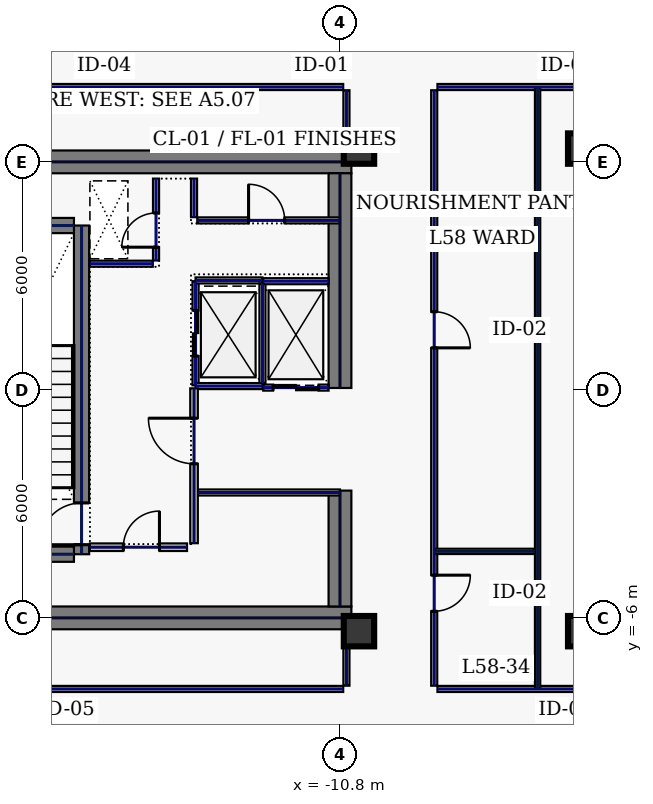
"""IFC4 building model, lengths in metres.
Left out: names, types, materials, properties, quantities, classifications, styles, units other than length and angle.
Written with IfcOpenShell. Run it as: python <this file> out.ifc"""

import sys

from ifc_helpers import new_model, si_unit, direction, frame, frame_2d, origin, origin_2d, place, context, subcontext, project, spatial, rectangle, hollow_rectangle, extrude, element, fill, save


model = new_model("IFC4")
c1 = context("Model", 3, precision=1e-05, world=origin(), true_north=direction((0.0, 1.0)))
c2 = subcontext(c1, "Body", "Model", "MODEL_VIEW")
j1 = project(units=[si_unit("LENGTHUNIT", "METRE"), si_unit("PLANEANGLEUNIT", "RADIAN")], contexts=[c1])
p1 = place(None, origin())
s1 = spatial("IfcSite", under=j1, at=p1, CompositionType="ELEMENT")
p2 = place(p1, origin())
s2 = spatial("IfcBuilding", under=s1, at=p2, CompositionType="ELEMENT")
p3 = place(p2, frame((0.0, 0.0, 251.0)))
s3 = spatial("IfcBuildingStorey", under=s2, at=p3, CompositionType="ELEMENT", Elevation=251.0)
for number, where, z_axis, x_axis in (
    (1, (-22.0, 6.0, 0.0), (0.0, 0.0, 1.0), (1.0, 0.0, 0.0)),
    (2, (-22.0, -6.0, 0.0), (0.0, 0.0, 1.0), (1.0, 0.0, 0.0)),
):
    element("IfcWall", number, at=place(p3, frame(where, z_axis=z_axis, x_axis=x_axis)), inside=s3, PredefinedType="SHEAR", context=c2, shape_type="SweptSolid", body=[
        extrude(rectangle(XDim=11.5, YDim=0.6, at=frame_2d((5.75, 0.0))), origin(), (0.0, 0.0, 1.0), 3.74),
    ])
p4 = place(p3, frame((-10.8, -5.7, 0.0), z_axis=(0.0, 0.0, 1.0), x_axis=(0.0, 1.0, 0.0)))
e3 = element("IfcWall", 3, at=p4, inside=s3, PredefinedType="SHEAR", context=c2, shape_type="SweptSolid", body=[
    extrude(rectangle(XDim=3.05, YDim=0.6, at=frame_2d((1.525, 0.0))), origin(), (0.0, 0.0, 1.0), 3.74),
])
p5 = place(p3, frame((-10.8, 0.05, 0.0), z_axis=(0.0, 0.0, 1.0), x_axis=(0.0, 1.0, 0.0)))
e4 = element("IfcWall", 4, at=p5, inside=s3, PredefinedType="SHEAR", context=c2, shape_type="SweptSolid", body=[
    extrude(rectangle(XDim=5.65, YDim=0.6, at=frame_2d((2.825, 0.0))), origin(), (0.0, 0.0, 1.0), 3.74),
])
p6 = place(p3, frame((-17.6, -4.325, 0.0), z_axis=(0.0, 0.0, 1.0), x_axis=(0.0, 1.0, 0.0)))
e5 = element("IfcWall", 5, at=p6, inside=s3, PredefinedType="SHEAR", context=c2, shape_type="SweptSolid", body=[
    extrude(rectangle(XDim=8.65, YDim=0.4, at=frame_2d((4.325, 0.0))), origin(), (0.0, 0.0, 1.0), 3.74),
])
p7 = place(p6, frame((0.25, 0.0, 0.0)))
e6 = element("IfcOpeningElement", 6, at=p7, cuts=e5, PredefinedType="OPENING", context=c2, shape_type="SweptSolid", body=[
    extrude(rectangle(XDim=1.1, YDim=2.2, at=frame_2d((0.55, 1.1))), frame((0.0, 0.21, 0.0), z_axis=(0.0, -1.0, 0.0), x_axis=(1.0, 0.0, 0.0)), (0.0, 0.0, 1.0), 0.42),
])
for number, where, z_axis, x_axis in (
    (7, (-21.2, -4.325, 0.0), (0.0, 0.0, 1.0), (1.0, 0.0, 0.0)),
    (8, (-21.2, 4.325, 0.0), (0.0, 0.0, 1.0), (1.0, 0.0, 0.0)),
):
    element("IfcWall", number, at=place(p3, frame(where, z_axis=z_axis, x_axis=x_axis)), inside=s3, PredefinedType="SHEAR", context=c2, shape_type="SweptSolid", body=[
        extrude(rectangle(XDim=3.4, YDim=0.4, at=frame_2d((1.7, 0.0))), origin(), (0.0, 0.0, 1.0), 3.74),
    ])
for number, where, z_axis, x_axis in (
    (9, (-10.3, -6.35, 0.0), (0.0, 0.0, 1.0), (1.0, 0.0, 0.0)),
    (10, (-10.3, 6.35, 0.0), (0.0, 0.0, 1.0), (1.0, 0.0, 0.0)),
    (11, (-4.4, -6.35, 0.0), (0.0, 0.0, 1.0), (1.0, 0.0, 0.0)),
    (12, (-4.4, 6.35, 0.0), (0.0, 0.0, 1.0), (1.0, 0.0, 0.0)),
):
    element("IfcColumn", number, at=place(p3, frame(where, z_axis=z_axis, x_axis=x_axis)), inside=s3, PredefinedType="COLUMN", context=c2, shape_type="SweptSolid", body=[
        extrude(hollow_rectangle(XDim=0.8, YDim=0.8, WallThickness=0.036, at=origin_2d()), origin(), (0.0, 0.0, 1.0), 3.74),
    ])
p8 = place(p3, frame((-14.6, 0.12, 0.0), z_axis=(0.0, 0.0, 1.0), x_axis=(0.0, 1.0, 0.0)))
e13 = element("IfcWall", 13, at=p8, inside=s3, PredefinedType="PARTITIONING", context=c2, shape_type="SweptSolid", body=[
    extrude(rectangle(XDim=2.74, YDim=0.16, at=frame_2d((1.37, 0.0))), origin(), (0.0, 0.0, 1.0), 3.74),
])
p9 = place(p8, frame((0.77, 0.0, 0.0)))
e14 = element("IfcOpeningElement", 14, at=p9, cuts=e13, PredefinedType="OPENING", context=c2, shape_type="SweptSolid", body=[
    extrude(rectangle(XDim=1.2, YDim=2.2, at=frame_2d((0.6, 1.1))), frame((0.0, 0.09, 0.0), z_axis=(0.0, -1.0, 0.0), x_axis=(1.0, 0.0, 0.0)), (0.0, 0.0, 1.0), 0.18),
])
for number, where, z_axis, x_axis in (
    (15, (-14.6, 0.1, 0.0), (0.0, 0.0, 1.0), (1.0, 0.0, 0.0)),
    (16, (-14.6, 2.88, 0.0), (0.0, 0.0, 1.0), (1.0, 0.0, 0.0)),
):
    element("IfcWall", number, at=place(p3, frame(where, z_axis=z_axis, x_axis=x_axis)), inside=s3, PredefinedType="PARTITIONING", context=c2, shape_type="SweptSolid", body=[
        extrude(rectangle(XDim=1.76, YDim=0.16, at=frame_2d((0.88, 0.0))), origin(), (0.0, 0.0, 1.0), 3.74),
    ])
p10 = place(p3, frame((-12.84, 0.18, 0.0), z_axis=(0.0, 0.0, 1.0), x_axis=(0.0, 1.0, 0.0)))
e17 = element("IfcWall", 17, at=p10, inside=s3, PredefinedType="PARTITIONING", context=c2, shape_type="SweptSolid", body=[
    extrude(rectangle(XDim=2.62, YDim=0.16, at=frame_2d((1.31, 0.0))), origin(), (0.0, 0.0, 1.0), 3.74),
])
p11 = place(p3, frame((-12.82, 0.06, 0.0), z_axis=(0.0, 0.0, 1.0), x_axis=(1.0, 0.0, 0.0)))
e18 = element("IfcWall", 18, at=p11, inside=s3, PredefinedType="PARTITIONING", context=c2, shape_type="SweptSolid", body=[
    extrude(rectangle(XDim=1.72, YDim=0.16, at=frame_2d((0.86, 0.0))), origin(), (0.0, 0.0, 1.0), 3.74),
])
p12 = place(p11, frame((0.26, 0.0, 0.0)))
e19 = element("IfcOpeningElement", 19, at=p12, cuts=e18, PredefinedType="OPENING", context=c2, shape_type="SweptSolid", body=[
    extrude(rectangle(XDim=1.2, YDim=2.2, at=frame_2d((0.6, 1.1))), frame((0.0, 0.09, 0.0), z_axis=(0.0, -1.0, 0.0), x_axis=(1.0, 0.0, 0.0)), (0.0, 0.0, 1.0), 0.18),
])
p13 = place(p3, frame((-12.82, 2.86, 0.0), z_axis=(0.0, 0.0, 1.0), x_axis=(1.0, 0.0, 0.0)))
e20 = element("IfcWall", 20, at=p13, inside=s3, PredefinedType="PARTITIONING", context=c2, shape_type="SweptSolid", body=[
    extrude(rectangle(XDim=1.72, YDim=0.16, at=frame_2d((0.86, 0.0))), origin(), (0.0, 0.0, 1.0), 3.74),
])
p14 = place(p3, frame((-15.64, 3.405, 0.0), z_axis=(0.0, 0.0, 1.0), x_axis=(0.0, 1.0, 0.0)))
e21 = element("IfcWall", 21, at=p14, inside=s3, PredefinedType="PARTITIONING", context=c2, shape_type="SweptSolid", body=[
    extrude(rectangle(XDim=2.155, YDim=0.16, at=frame_2d((1.078, 0.0))), origin(), (0.0, 0.0, 1.0), 3.74),
])
p15 = place(p14, frame((0.35, 0.0, 0.0)))
e22 = element("IfcOpeningElement", 22, at=p15, cuts=e21, PredefinedType="OPENING", context=c2, shape_type="SweptSolid", body=[
    extrude(rectangle(XDim=0.9, YDim=2.2, at=frame_2d((0.45, 1.1))), frame((0.0, 0.09, 0.0), z_axis=(0.0, -1.0, 0.0), x_axis=(1.0, 0.0, 0.0)), (0.0, 0.0, 1.0), 0.18),
])
p16 = place(p3, frame((-17.38, 3.32, 0.0), z_axis=(0.0, 0.0, 1.0), x_axis=(1.0, 0.0, 0.0)))
e23 = element("IfcWall", 23, at=p16, inside=s3, PredefinedType="PARTITIONING", context=c2, shape_type="SweptSolid", body=[
    extrude(rectangle(XDim=1.655, YDim=0.16, at=frame_2d((0.827, 0.0))), origin(), (0.0, 0.0, 1.0), 3.74),
])
p17 = place(p3, frame((-17.38, -4.14, 0.0), z_axis=(0.0, 0.0, 1.0), x_axis=(1.0, 0.0, 0.0)))
e24 = element("IfcWall", 24, at=p17, inside=s3, PredefinedType="SOLIDWALL", context=c2, shape_type="SweptSolid", body=[
    extrude(rectangle(XDim=2.555, YDim=0.2, at=frame_2d((1.277, 0.0))), origin(), (0.0, 0.0, 1.0), 3.74),
])
p18 = place(p17, frame((0.88, 0.0, 0.0)))
e25 = element("IfcOpeningElement", 25, at=p18, cuts=e24, PredefinedType="OPENING", context=c2, shape_type="SweptSolid", body=[
    extrude(rectangle(XDim=0.95, YDim=2.2, at=frame_2d((0.475, 1.1))), frame((0.0, 0.11, 0.0), z_axis=(0.0, -1.0, 0.0), x_axis=(1.0, 0.0, 0.0)), (0.0, 0.0, 1.0), 0.22),
])
p19 = place(p3, frame((-14.535, -2.7, 0.0), z_axis=(0.0, 0.0, 1.0), x_axis=(1.0, 0.0, 0.0)))
e26 = element("IfcWall", 26, at=p19, inside=s3, PredefinedType="PARTITIONING", context=c2, shape_type="SweptSolid", body=[
    extrude(rectangle(XDim=3.735, YDim=0.16, at=frame_2d((1.867, 0.0))), origin(), (0.0, 0.0, 1.0), 3.74),
])
p20 = place(p3, frame((-14.555, 4.46, 0.0), z_axis=(0.0, 0.0, 1.0), x_axis=(1.0, 0.0, 0.0)))
e27 = element("IfcWall", 27, at=p20, inside=s3, PredefinedType="PARTITIONING", context=c2, shape_type="SweptSolid", body=[
    extrude(rectangle(XDim=3.755, YDim=0.16, at=frame_2d((1.877, 0.0))), origin(), (0.0, 0.0, 1.0), 3.74),
])
p21 = place(p20, frame((1.35, 0.0, 0.0)))
e28 = element("IfcOpeningElement", 28, at=p21, cuts=e27, PredefinedType="OPENING", context=c2, shape_type="SweptSolid", body=[
    extrude(rectangle(XDim=0.95, YDim=2.2, at=frame_2d((0.475, 1.1))), frame((0.0, 0.09, 0.0), z_axis=(0.0, -1.0, 0.0), x_axis=(1.0, 0.0, 0.0)), (0.0, 0.0, 1.0), 0.18),
])
p22 = place(p3, frame((-14.64, 4.545, 0.0), z_axis=(0.0, 0.0, 1.0), x_axis=(0.0, 1.0, 0.0)))
e29 = element("IfcWall", 29, at=p22, inside=s3, PredefinedType="PARTITIONING", context=c2, shape_type="SweptSolid", body=[
    extrude(rectangle(XDim=1.015, YDim=0.16, at=frame_2d((0.508, 0.0))), origin(), (0.0, 0.0, 1.0), 3.74),
])
p23 = place(p3, frame((-14.64, -4.035, 0.0), z_axis=(0.0, 0.0, 1.0), x_axis=(0.0, 1.0, 0.0)))
e30 = element("IfcWall", 30, at=p23, inside=s3, PredefinedType="SOLIDWALL", context=c2, shape_type="SweptSolid", body=[
    extrude(rectangle(XDim=4.075, YDim=0.2, at=frame_2d((2.038, 0.0))), origin(), (0.0, 0.0, 1.0), 3.74),
])
p24 = place(p23, frame((2.09, 0.0, 0.0)))
e31 = element("IfcOpeningElement", 31, at=p24, cuts=e30, PredefinedType="OPENING", context=c2, shape_type="SweptSolid", body=[
    extrude(rectangle(XDim=1.2, YDim=2.2, at=frame_2d((0.6, 1.1))), frame((0.0, 0.11, 0.0), z_axis=(0.0, -1.0, 0.0), x_axis=(1.0, 0.0, 0.0)), (0.0, 0.0, 1.0), 0.22),
])
p25 = place(p3, frame((-3.965, 7.97, 0.0), z_axis=(0.0, 0.0, 1.0), x_axis=(-1.0, 0.0, 0.0)))
e32 = element("IfcWall", 32, at=p25, inside=s3, PredefinedType="PARTITIONING", context=c2, shape_type="SweptSolid", body=[
    extrude(rectangle(XDim=4.27, YDim=0.16, at=frame_2d((2.135, 0.0))), origin(), (0.0, 0.0, 1.0), 3.74),
])
p26 = place(p3, frame((-8.32, 7.885, 0.0), z_axis=(0.0, 0.0, 1.0), x_axis=(0.0, -1.0, 0.0)))
e33 = element("IfcWall", 33, at=p26, inside=s3, PredefinedType="PARTITIONING", context=c2, shape_type="SweptSolid", body=[
    extrude(rectangle(XDim=15.67, YDim=0.16, at=frame_2d((7.835, 0.0))), origin(), (0.0, 0.0, 1.0), 3.74),
])
p27 = place(p26, frame((12.761, 0.0, 0.0)))
e34 = element("IfcOpeningElement", 34, at=p27, cuts=e33, PredefinedType="OPENING", context=c2, shape_type="SweptSolid", body=[
    extrude(rectangle(XDim=0.95, YDim=2.2, at=frame_2d((0.475, 1.1))), frame((0.0, 0.09, 0.0), z_axis=(0.0, -1.0, 0.0), x_axis=(1.0, 0.0, 0.0)), (0.0, 0.0, 1.0), 0.18),
])
p28 = place(p26, frame((5.829, 0.0, 0.0)))
e35 = element("IfcOpeningElement", 35, at=p28, cuts=e33, PredefinedType="OPENING", context=c2, shape_type="SweptSolid", body=[
    extrude(rectangle(XDim=0.95, YDim=2.2, at=frame_2d((0.475, 1.1))), frame((0.0, 0.09, 0.0), z_axis=(0.0, -1.0, 0.0), x_axis=(1.0, 0.0, 0.0)), (0.0, 0.0, 1.0), 0.18),
])
p29 = place(p3, frame((-8.235, -7.87, 0.0), z_axis=(0.0, 0.0, 1.0), x_axis=(1.0, 0.0, 0.0)))
e36 = element("IfcWall", 36, at=p29, inside=s3, PredefinedType="PARTITIONING", context=c2, shape_type="SweptSolid", body=[
    extrude(rectangle(XDim=4.27, YDim=0.16, at=frame_2d((2.135, 0.0))), origin(), (0.0, 0.0, 1.0), 3.74),
])
p30 = place(p3, frame((-10.63, -7.785, 0.0), z_axis=(0.0, 0.0, 1.0), x_axis=(0.0, 1.0, 0.0)))
e37 = element("IfcWall", 37, at=p30, inside=s3, PredefinedType="PARTITIONING", context=c2, shape_type="SweptSolid", body=[
    extrude(rectangle(XDim=1.365, YDim=0.16, at=frame_2d((0.683, 0.0))), origin(), (0.0, 0.0, 1.0), 3.285),
])
p31 = place(p3, frame((-10.63, 6.42, 0.0), z_axis=(0.0, 0.0, 1.0), x_axis=(0.0, 1.0, 0.0)))
e38 = element("IfcWall", 38, at=p31, inside=s3, PredefinedType="PARTITIONING", context=c2, shape_type="SweptSolid", body=[
    extrude(rectangle(XDim=1.465, YDim=0.16, at=frame_2d((0.732, 0.0))), origin(), (0.0, 0.0, 1.0), 3.74),
])
for number, where, z_axis, x_axis in (
    (39, (-10.715, 7.97, 0.0), (0.0, 0.0, 1.0), (-1.0, 0.0, 0.0)),
    (40, (-22.585, -7.87, 0.0), (0.0, 0.0, 1.0), (1.0, 0.0, 0.0)),
):
    element("IfcWall", number, at=place(p3, frame(where, z_axis=z_axis, x_axis=x_axis)), inside=s3, PredefinedType="PARTITIONING", context=c2, shape_type="SweptSolid", body=[
        extrude(rectangle(XDim=11.87, YDim=0.16, at=frame_2d((5.935, 0.0))), origin(), (0.0, 0.0, 1.0), 3.74),
    ])
p32 = place(p3, frame((-5.6, -7.865, 0.0), z_axis=(0.0, 0.0, 1.0), x_axis=(0.0, 1.0, 0.0)))
e41 = element("IfcWall", 41, at=p32, inside=s3, PredefinedType="PARTITIONING", context=c2, shape_type="SweptSolid", body=[
    extrude(rectangle(XDim=15.83, YDim=0.14, at=frame_2d((7.915, 0.0))), origin(), (0.0, 0.0, 1.0), 3.74),
])
p33 = place(p3, frame((-8.315, -4.25, 0.0), z_axis=(0.0, 0.0, 1.0), x_axis=(1.0, 0.0, 0.0)))
e42 = element("IfcWall", 42, at=p33, inside=s3, PredefinedType="PARTITIONING", context=c2, shape_type="SweptSolid", body=[
    extrude(rectangle(XDim=2.64, YDim=0.14, at=frame_2d((1.32, 0.0))), origin(), (0.0, 0.0, 1.0), 3.74),
])
p34 = place(p7, origin())
e43 = element("IfcDoor", 43, at=p34, inside=s3, OperationType="SINGLE_SWING_LEFT", PredefinedType="DOOR", context=c2, shape_type="SweptSolid", body=[
    extrude(rectangle(XDim=1.1, YDim=2.2, at=frame_2d((0.55, 1.1))), frame((0.0, 0.025, 0.0), z_axis=(0.0, -1.0, 0.0), x_axis=(1.0, 0.0, 0.0)), (0.0, 0.0, 1.0), 0.05),
])
fill(e6, e43)
p35 = place(p9, origin())
e44 = element("IfcDoor", 44, at=p35, inside=s3, OperationType="SLIDING_TO_LEFT", PredefinedType="DOOR", context=c2, shape_type="SweptSolid", body=[
    extrude(rectangle(XDim=1.2, YDim=2.2, at=frame_2d((0.6, 1.1))), frame((0.0, 0.025, 0.0), z_axis=(0.0, -1.0, 0.0), x_axis=(1.0, 0.0, 0.0)), (0.0, 0.0, 1.0), 0.05),
])
fill(e14, e44)
p36 = place(p12, origin())
e45 = element("IfcDoor", 45, at=p36, inside=s3, OperationType="SLIDING_TO_LEFT", PredefinedType="DOOR", context=c2, shape_type="SweptSolid", body=[
    extrude(rectangle(XDim=1.2, YDim=2.2, at=frame_2d((0.6, 1.1))), frame((0.0, 0.025, 0.0), z_axis=(0.0, -1.0, 0.0), x_axis=(1.0, 0.0, 0.0)), (0.0, 0.0, 1.0), 0.05),
])
fill(e19, e45)
p37 = place(p15, origin())
e46 = element("IfcDoor", 46, at=p37, inside=s3, OperationType="SINGLE_SWING_LEFT", PredefinedType="DOOR", context=c2, shape_type="SweptSolid", body=[
    extrude(rectangle(XDim=0.9, YDim=2.2, at=frame_2d((0.45, 1.1))), frame((0.0, 0.025, 0.0), z_axis=(0.0, -1.0, 0.0), x_axis=(1.0, 0.0, 0.0)), (0.0, 0.0, 1.0), 0.05),
])
fill(e22, e46)
p38 = place(p18, origin())
e47 = element("IfcDoor", 47, at=p38, inside=s3, OperationType="SINGLE_SWING_RIGHT", PredefinedType="DOOR", context=c2, shape_type="SweptSolid", body=[
    extrude(rectangle(XDim=0.95, YDim=2.2, at=frame_2d((0.475, 1.1))), frame((0.0, 0.025, 0.0), z_axis=(0.0, -1.0, 0.0), x_axis=(1.0, 0.0, 0.0)), (0.0, 0.0, 1.0), 0.05),
])
fill(e25, e47)
p39 = place(p21, origin())
e48 = element("IfcDoor", 48, at=p39, inside=s3, OperationType="SINGLE_SWING_LEFT", PredefinedType="DOOR", context=c2, shape_type="SweptSolid", body=[
    extrude(rectangle(XDim=0.95, YDim=2.2, at=frame_2d((0.475, 1.1))), frame((0.0, 0.025, 0.0), z_axis=(0.0, -1.0, 0.0), x_axis=(1.0, 0.0, 0.0)), (0.0, 0.0, 1.0), 0.05),
])
fill(e28, e48)
p40 = place(p24, origin())
e49 = element("IfcDoor", 49, at=p40, inside=s3, OperationType="SINGLE_SWING_RIGHT", PredefinedType="DOOR", context=c2, shape_type="SweptSolid", body=[
    extrude(rectangle(XDim=1.2, YDim=2.2, at=frame_2d((0.6, 1.1))), frame((0.0, 0.025, 0.0), z_axis=(0.0, -1.0, 0.0), x_axis=(1.0, 0.0, 0.0)), (0.0, 0.0, 1.0), 0.05),
])
fill(e31, e49)
p41 = place(p27, origin())
e50 = element("IfcDoor", 50, at=p41, inside=s3, OperationType="SINGLE_SWING_LEFT", PredefinedType="DOOR", context=c2, shape_type="SweptSolid", body=[
    extrude(rectangle(XDim=0.95, YDim=2.2, at=frame_2d((0.475, 1.1))), frame((0.0, 0.025, 0.0), z_axis=(0.0, -1.0, 0.0), x_axis=(1.0, 0.0, 0.0)), (0.0, 0.0, 1.0), 0.05),
])
fill(e34, e50)
p42 = place(p28, origin())
e51 = element("IfcDoor", 51, at=p42, inside=s3, OperationType="SINGLE_SWING_RIGHT", PredefinedType="DOOR", context=c2, shape_type="SweptSolid", body=[
    extrude(rectangle(XDim=0.95, YDim=2.2, at=frame_2d((0.475, 1.1))), frame((0.0, 0.025, 0.0), z_axis=(0.0, -1.0, 0.0), x_axis=(1.0, 0.0, 0.0)), (0.0, 0.0, 1.0), 0.05),
])
fill(e35, e51)
save(model, sys.argv[1])
